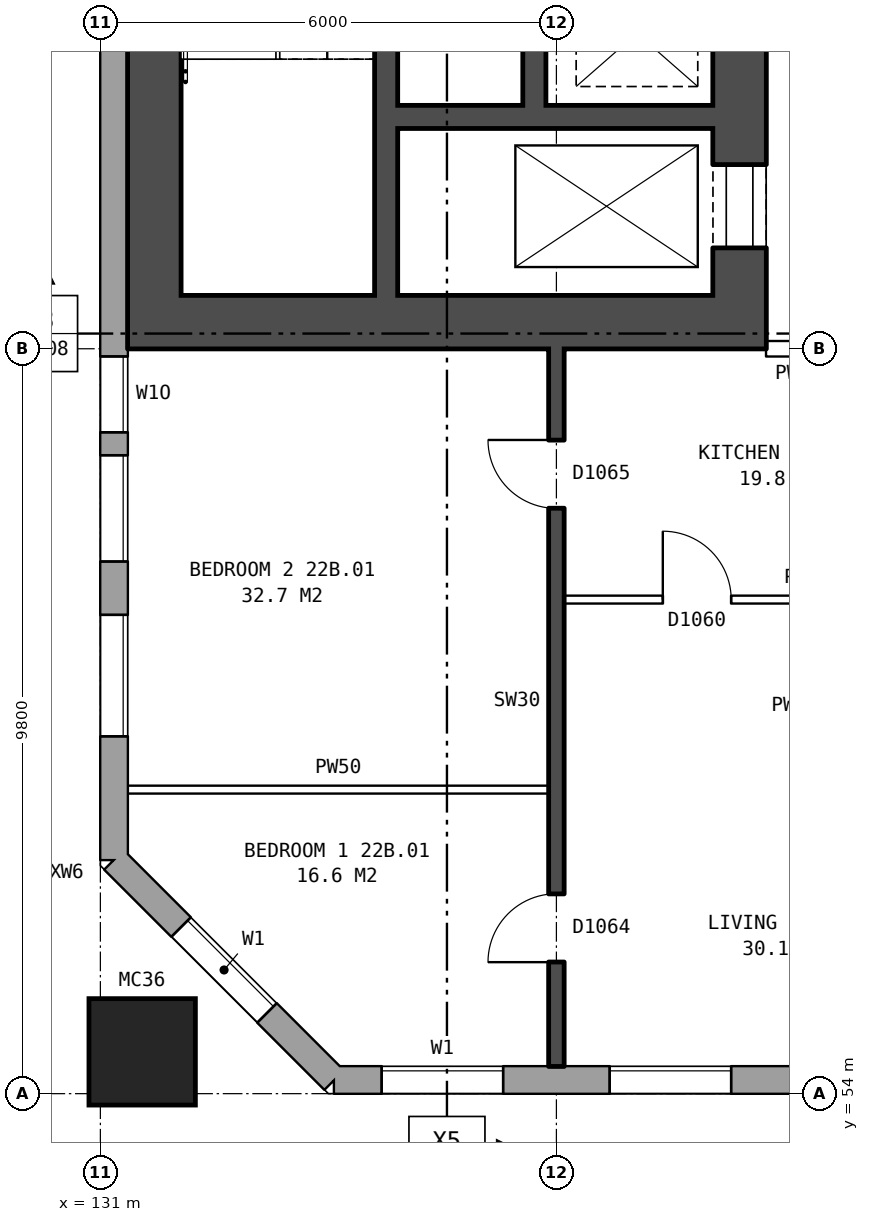
"""IFC4 building model, lengths in metres.
Left out: names, types, materials, properties, quantities, classifications, styles, units other than length and angle.
Written with IfcOpenShell. Run it as: python <this file> out.ifc"""

import sys

from ifc_helpers import new_model, si_unit, direction, frame, frame_2d, origin, origin_2d, place, context, subcontext, project, spatial, rectangle, hollow_rectangle, extrude, element, fill, save


model = new_model("IFC4")
c1 = context("Model", 3, precision=1e-05, world=origin(), true_north=direction((0.0, 1.0)))
c2 = subcontext(c1, "Body", "Model", "MODEL_VIEW")
j1 = project(units=[si_unit("LENGTHUNIT", "METRE"), si_unit("PLANEANGLEUNIT", "RADIAN")], contexts=[c1])
p1 = place(None, origin())
s1 = spatial("IfcSite", under=j1, at=p1, CompositionType="ELEMENT")
p2 = place(p1, origin())
s2 = spatial("IfcBuilding", under=s1, at=p2, CompositionType="ELEMENT")
p3 = place(p2, frame((0.0, 0.0, 80.9)))
s3 = spatial("IfcBuildingStorey", under=s2, at=p3, CompositionType="ELEMENT", Elevation=80.9)
p4 = place(p3, frame((131.55, 54.55, 0.0), z_axis=(0.0, 0.0, 1.0), x_axis=(1.0, 0.0, 0.0)))
e1 = element("IfcColumn", 1, at=p4, inside=s3, PredefinedType="COLUMN", context=c2, shape_type="SweptSolid", body=[
    extrude(hollow_rectangle(XDim=1.4, YDim=1.4, WallThickness=0.075, at=origin_2d()), origin(), (0.0, 0.0, 1.0), 3.1),
])
p5 = place(p3, frame((131.18, 57.075, 0.0), z_axis=(0.0, 0.0, 1.0), x_axis=(0.707106781187, -0.707106781187, 0.0)))
e2 = element("IfcWall", 2, at=p5, inside=s3, PredefinedType="STANDARD", context=c2, shape_type="SweptSolid", body=[
    extrude(rectangle(XDim=4.094, YDim=0.36, at=frame_2d((2.047, 0.0))), origin(), (0.0, 0.0, 1.0), 2.85),
])
p6 = place(p5, frame((1.247, 0.0, 0.8)))
e3 = element("IfcOpeningElement", 3, at=p6, cuts=e2, PredefinedType="OPENING", context=c2, shape_type="SweptSolid", body=[
    extrude(rectangle(XDim=1.6, YDim=1.8, at=frame_2d((0.8, 0.9))), frame((0.0, 0.19, 0.0), z_axis=(0.0, -1.0, 0.0), x_axis=(1.0, 0.0, 0.0)), (0.0, 0.0, 1.0), 0.38),
])
p7 = place(p3, frame((134.075, 54.18, 0.0), z_axis=(0.0, 0.0, 1.0), x_axis=(1.0, 0.0, 0.0)))
e4 = element("IfcWall", 4, at=p7, inside=s3, PredefinedType="STANDARD", context=c2, shape_type="SweptSolid", body=[
    extrude(rectangle(XDim=38.101, YDim=0.36, at=frame_2d((19.05, 0.0))), origin(), (0.0, 0.0, 1.0), 2.85),
])
p8 = place(p7, frame((0.625, 0.0, 0.8)))
e5 = element("IfcOpeningElement", 5, at=p8, cuts=e4, PredefinedType="OPENING", context=c2, shape_type="SweptSolid", body=[
    extrude(rectangle(XDim=1.6, YDim=1.8, at=frame_2d((0.8, 0.9))), frame((0.0, 0.19, 0.0), z_axis=(0.0, -1.0, 0.0), x_axis=(1.0, 0.0, 0.0)), (0.0, 0.0, 1.0), 0.38),
])
p9 = place(p7, frame((3.625, 0.0, 0.8)))
e6 = element("IfcOpeningElement", 6, at=p9, cuts=e4, PredefinedType="OPENING", context=c2, shape_type="SweptSolid", body=[
    extrude(rectangle(XDim=1.6, YDim=1.8, at=frame_2d((0.8, 0.9))), frame((0.0, 0.19, 0.0), z_axis=(0.0, -1.0, 0.0), x_axis=(1.0, 0.0, 0.0)), (0.0, 0.0, 1.0), 0.38),
])
p10 = place(p7, frame((6.625, 0.0, 0.8)))
e7 = element("IfcOpeningElement", 7, at=p10, cuts=e4, PredefinedType="OPENING", context=c2, shape_type="SweptSolid", body=[
    extrude(rectangle(XDim=1.6, YDim=1.8, at=frame_2d((0.8, 0.9))), frame((0.0, 0.19, 0.0), z_axis=(0.0, -1.0, 0.0), x_axis=(1.0, 0.0, 0.0)), (0.0, 0.0, 1.0), 0.38),
])
p11 = place(p7, frame((9.125, 0.0, 0.8)))
e8 = element("IfcOpeningElement", 8, at=p11, cuts=e4, PredefinedType="OPENING", context=c2, shape_type="SweptSolid", body=[
    extrude(rectangle(XDim=1.4, YDim=1.8, at=frame_2d((0.7, 0.9))), frame((0.0, 0.19, 0.0), z_axis=(0.0, -1.0, 0.0), x_axis=(1.0, 0.0, 0.0)), (0.0, 0.0, 1.0), 0.38),
])
p12 = place(p7, frame((12.575, 0.0, 0.8)))
e9 = element("IfcOpeningElement", 9, at=p12, cuts=e4, PredefinedType="OPENING", context=c2, shape_type="SweptSolid", body=[
    extrude(rectangle(XDim=0.6, YDim=0.9, at=frame_2d((0.3, 0.45))), frame((0.0, 0.19, 0.0), z_axis=(0.0, -1.0, 0.0), x_axis=(1.0, 0.0, 0.0)), (0.0, 0.0, 1.0), 0.38),
])
p13 = place(p7, frame((15.625, 0.0, 0.8)))
e10 = element("IfcOpeningElement", 10, at=p13, cuts=e4, PredefinedType="OPENING", context=c2, shape_type="SweptSolid", body=[
    extrude(rectangle(XDim=1.6, YDim=1.8, at=frame_2d((0.8, 0.9))), frame((0.0, 0.19, 0.0), z_axis=(0.0, -1.0, 0.0), x_axis=(1.0, 0.0, 0.0)), (0.0, 0.0, 1.0), 0.38),
])
p14 = place(p7, frame((18.625, 0.0, 0.8)))
e11 = element("IfcOpeningElement", 11, at=p14, cuts=e4, PredefinedType="OPENING", context=c2, shape_type="SweptSolid", body=[
    extrude(rectangle(XDim=1.6, YDim=1.8, at=frame_2d((0.8, 0.9))), frame((0.0, 0.19, 0.0), z_axis=(0.0, -1.0, 0.0), x_axis=(1.0, 0.0, 0.0)), (0.0, 0.0, 1.0), 0.38),
])
p15 = place(p7, frame((21.625, 0.0, 0.8)))
e12 = element("IfcOpeningElement", 12, at=p15, cuts=e4, PredefinedType="OPENING", context=c2, shape_type="SweptSolid", body=[
    extrude(rectangle(XDim=1.6, YDim=1.8, at=frame_2d((0.8, 0.9))), frame((0.0, 0.19, 0.0), z_axis=(0.0, -1.0, 0.0), x_axis=(1.0, 0.0, 0.0)), (0.0, 0.0, 1.0), 0.38),
])
p16 = place(p7, frame((23.525, 0.0, 0.8)))
e13 = element("IfcOpeningElement", 13, at=p16, cuts=e4, PredefinedType="OPENING", context=c2, shape_type="SweptSolid", body=[
    extrude(rectangle(XDim=1.0, YDim=1.8, at=frame_2d((0.5, 0.9))), frame((0.0, 0.19, 0.0), z_axis=(0.0, -1.0, 0.0), x_axis=(1.0, 0.0, 0.0)), (0.0, 0.0, 1.0), 0.38),
])
p17 = place(p7, frame((27.625, 0.0, 0.8)))
e14 = element("IfcOpeningElement", 14, at=p17, cuts=e4, PredefinedType="OPENING", context=c2, shape_type="SweptSolid", body=[
    extrude(rectangle(XDim=1.6, YDim=1.8, at=frame_2d((0.8, 0.9))), frame((0.0, 0.19, 0.0), z_axis=(0.0, -1.0, 0.0), x_axis=(1.0, 0.0, 0.0)), (0.0, 0.0, 1.0), 0.38),
])
p18 = place(p7, frame((30.625, 0.0, 0.8)))
e15 = element("IfcOpeningElement", 15, at=p18, cuts=e4, PredefinedType="OPENING", context=c2, shape_type="SweptSolid", body=[
    extrude(rectangle(XDim=1.6, YDim=1.8, at=frame_2d((0.8, 0.9))), frame((0.0, 0.19, 0.0), z_axis=(0.0, -1.0, 0.0), x_axis=(1.0, 0.0, 0.0)), (0.0, 0.0, 1.0), 0.38),
])
p19 = place(p7, frame((33.625, 0.0, 0.8)))
e16 = element("IfcOpeningElement", 16, at=p19, cuts=e4, PredefinedType="OPENING", context=c2, shape_type="SweptSolid", body=[
    extrude(rectangle(XDim=1.6, YDim=1.8, at=frame_2d((0.8, 0.9))), frame((0.0, 0.19, 0.0), z_axis=(0.0, -1.0, 0.0), x_axis=(1.0, 0.0, 0.0)), (0.0, 0.0, 1.0), 0.38),
])
p20 = place(p7, frame((10.825, 0.0, 1.7)))
e17 = element("IfcOpeningElement", 17, at=p20, cuts=e4, PredefinedType="OPENING", context=c2, shape_type="SweptSolid", body=[
    extrude(rectangle(XDim=0.6, YDim=0.9, at=frame_2d((0.3, 0.45))), frame((0.0, 0.19, 0.0), z_axis=(0.0, -1.0, 0.0), x_axis=(1.0, 0.0, 0.0)), (0.0, 0.0, 1.0), 0.38),
])
p21 = place(p7, frame((13.475, 0.0, 0.8)))
e18 = element("IfcOpeningElement", 18, at=p21, cuts=e4, PredefinedType="OPENING", context=c2, shape_type="SweptSolid", body=[
    extrude(rectangle(XDim=1.2, YDim=1.8, at=frame_2d((0.6, 0.9))), frame((0.0, 0.19, 0.0), z_axis=(0.0, -1.0, 0.0), x_axis=(1.0, 0.0, 0.0)), (0.0, 0.0, 1.0), 0.38),
])
p22 = place(p7, frame((24.825, 0.0, 0.8)))
e19 = element("IfcOpeningElement", 19, at=p22, cuts=e4, PredefinedType="OPENING", context=c2, shape_type="SweptSolid", body=[
    extrude(rectangle(XDim=0.6, YDim=0.9, at=frame_2d((0.3, 0.45))), frame((0.0, 0.19, 0.0), z_axis=(0.0, -1.0, 0.0), x_axis=(1.0, 0.0, 0.0)), (0.0, 0.0, 1.0), 0.38),
])
p23 = place(p3, frame((131.18, 82.925, 0.0), z_axis=(0.0, 0.0, 1.0), x_axis=(0.0, -1.0, 0.0)))
e20 = element("IfcWall", 20, at=p23, inside=s3, PredefinedType="STANDARD", context=c2, shape_type="SweptSolid", body=[
    extrude(rectangle(XDim=25.851, YDim=0.36, at=frame_2d((12.925, 0.0))), origin(), (0.0, 0.0, 1.0), 2.85),
])
p24 = place(p23, frame((1.625, 0.0, 0.8)))
e21 = element("IfcOpeningElement", 21, at=p24, cuts=e20, PredefinedType="OPENING", context=c2, shape_type="SweptSolid", body=[
    extrude(rectangle(XDim=1.6, YDim=1.8, at=frame_2d((0.8, 0.9))), frame((0.0, 0.19, 0.0), z_axis=(0.0, -1.0, 0.0), x_axis=(1.0, 0.0, 0.0)), (0.0, 0.0, 1.0), 0.38),
])
p25 = place(p23, frame((3.525, 0.0, 0.8)))
e22 = element("IfcOpeningElement", 22, at=p25, cuts=e20, PredefinedType="OPENING", context=c2, shape_type="SweptSolid", body=[
    extrude(rectangle(XDim=1.4, YDim=1.8, at=frame_2d((0.7, 0.9))), frame((0.0, 0.19, 0.0), z_axis=(0.0, -1.0, 0.0), x_axis=(1.0, 0.0, 0.0)), (0.0, 0.0, 1.0), 0.38),
])
p26 = place(p23, frame((19.225, 0.0, 0.8)))
e23 = element("IfcOpeningElement", 23, at=p26, cuts=e20, PredefinedType="OPENING", context=c2, shape_type="SweptSolid", body=[
    extrude(rectangle(XDim=1.0, YDim=1.2, at=frame_2d((0.5, 0.6))), frame((0.0, 0.19, 0.0), z_axis=(0.0, -1.0, 0.0), x_axis=(1.0, 0.0, 0.0)), (0.0, 0.0, 1.0), 0.38),
])
p27 = place(p23, frame((22.625, 0.0, 0.8)))
e24 = element("IfcOpeningElement", 24, at=p27, cuts=e20, PredefinedType="OPENING", context=c2, shape_type="SweptSolid", body=[
    extrude(rectangle(XDim=1.6, YDim=1.8, at=frame_2d((0.8, 0.9))), frame((0.0, 0.19, 0.0), z_axis=(0.0, -1.0, 0.0), x_axis=(1.0, 0.0, 0.0)), (0.0, 0.0, 1.0), 0.38),
])
p28 = place(p23, frame((5.225, 0.0, 0.8)))
e25 = element("IfcOpeningElement", 25, at=p28, cuts=e20, PredefinedType="OPENING", context=c2, shape_type="SweptSolid", body=[
    extrude(rectangle(XDim=0.8, YDim=1.5, at=frame_2d((0.4, 0.75))), frame((0.0, 0.19, 0.0), z_axis=(0.0, -1.0, 0.0), x_axis=(1.0, 0.0, 0.0)), (0.0, 0.0, 1.0), 0.38),
])
p29 = place(p23, frame((20.525, 0.0, 0.8)))
e26 = element("IfcOpeningElement", 26, at=p29, cuts=e20, PredefinedType="OPENING", context=c2, shape_type="SweptSolid", body=[
    extrude(rectangle(XDim=1.4, YDim=1.8, at=frame_2d((0.7, 0.9))), frame((0.0, 0.19, 0.0), z_axis=(0.0, -1.0, 0.0), x_axis=(1.0, 0.0, 0.0)), (0.0, 0.0, 1.0), 0.38),
])
p30 = place(p3, frame((139.41, 64.5, 0.0), z_axis=(0.0, 0.0, 1.0), x_axis=(0.0, 1.0, 0.0)))
e27 = element("IfcWall", 27, at=p30, inside=s3, PredefinedType="SHEAR", context=c2, shape_type="SweptSolid", body=[
    extrude(rectangle(XDim=11.0, YDim=0.7, at=frame_2d((5.5, 0.0))), origin(), (0.0, 0.0, 1.0), 2.85),
])
p31 = place(p30, frame((0.625, 0.0, 0.0)))
e28 = element("IfcOpeningElement", 28, at=p31, cuts=e27, PredefinedType="OPENING", context=c2, shape_type="SweptSolid", body=[
    extrude(rectangle(XDim=1.1, YDim=2.1, at=frame_2d((0.55, 1.05))), frame((0.0, 0.36, 0.0), z_axis=(0.0, -1.0, 0.0), x_axis=(1.0, 0.0, 0.0)), (0.0, 0.0, 1.0), 0.72),
])
p32 = place(p30, frame((9.2, 0.0, 0.0)))
e29 = element("IfcOpeningElement", 29, at=p32, cuts=e27, PredefinedType="OPENING", context=c2, shape_type="SweptSolid", body=[
    extrude(rectangle(XDim=1.1, YDim=2.1, at=frame_2d((0.55, 1.05))), frame((0.0, 0.36, 0.0), z_axis=(0.0, -1.0, 0.0), x_axis=(1.0, 0.0, 0.0)), (0.0, 0.0, 1.0), 0.72),
])
p33 = place(p30, frame((7.425, 0.0, 0.0)))
e30 = element("IfcOpeningElement", 30, at=p33, cuts=e27, PredefinedType="OPENING", context=c2, shape_type="SweptSolid", body=[
    extrude(rectangle(XDim=0.85, YDim=2.1, at=frame_2d((0.425, 1.05))), frame((0.0, 0.36, 0.0), z_axis=(0.0, -1.0, 0.0), x_axis=(1.0, 0.0, 0.0)), (0.0, 0.0, 1.0), 0.72),
])
p34 = place(p3, frame((131.71, 64.5, 0.0), z_axis=(0.0, 0.0, 1.0), x_axis=(0.0, 1.0, 0.0)))
e31 = element("IfcWall", 31, at=p34, inside=s3, PredefinedType="SHEAR", context=c2, shape_type="SweptSolid", body=[
    extrude(rectangle(XDim=11.0, YDim=0.7, at=frame_2d((5.5, 0.0))), origin(), (0.0, 0.0, 1.0), 2.85),
])
p35 = place(p3, frame((139.76, 64.15, 0.0), z_axis=(0.0, 0.0, 1.0), x_axis=(-1.0, 0.0, 0.0)))
e32 = element("IfcWall", 32, at=p35, inside=s3, PredefinedType="SHEAR", context=c2, shape_type="SweptSolid", body=[
    extrude(rectangle(XDim=8.4, YDim=0.7, at=frame_2d((4.2, 0.0))), origin(), (0.0, 0.0, 1.0), 2.85),
])
p36 = place(p3, frame((139.06, 66.85, 0.0), z_axis=(0.0, 0.0, 1.0), x_axis=(-1.0, 0.0, 0.0)))
e33 = element("IfcWall", 33, at=p36, inside=s3, PredefinedType="SHEAR", context=c2, shape_type="SweptSolid", body=[
    extrude(rectangle(XDim=4.15, YDim=0.3, at=frame_2d((2.075, 0.0))), origin(), (0.0, 0.0, 1.0), 2.85),
])
p37 = place(p3, frame((136.71, 67.0, 0.0), z_axis=(0.0, 0.0, 1.0), x_axis=(0.0, 1.0, 0.0)))
e34 = element("IfcWall", 34, at=p37, inside=s3, PredefinedType="SHEAR", context=c2, shape_type="SweptSolid", body=[
    extrude(rectangle(XDim=4.1, YDim=0.3, at=frame_2d((2.05, 0.0))), origin(), (0.0, 0.0, 1.0), 2.85),
])
p38 = place(p3, frame((134.76, 64.5, 0.0), z_axis=(0.0, 0.0, 1.0), x_axis=(0.0, 1.0, 0.0)))
e35 = element("IfcWall", 35, at=p38, inside=s3, PredefinedType="SHEAR", context=c2, shape_type="SweptSolid", body=[
    extrude(rectangle(XDim=6.6, YDim=0.3, at=frame_2d((3.3, 0.0))), origin(), (0.0, 0.0, 1.0), 2.85),
])
p39 = place(p3, frame((131.36, 58.0, 0.0), z_axis=(0.0, 0.0, 1.0), x_axis=(1.0, 0.0, 0.0)))
e36 = element("IfcWall", 36, at=p39, inside=s3, PredefinedType="PARTITIONING", context=c2, shape_type="SweptSolid", body=[
    extrude(rectangle(XDim=5.54, YDim=0.1, at=frame_2d((2.77, 0.0))), origin(), (0.0, 0.0, 1.0), 2.85),
])
p40 = place(p3, frame((137.1, 60.5, 0.0), z_axis=(0.0, 0.0, 1.0), x_axis=(1.0, 0.0, 0.0)))
e37 = element("IfcWall", 37, at=p40, inside=s3, PredefinedType="PARTITIONING", context=c2, shape_type="SweptSolid", body=[
    extrude(rectangle(XDim=5.8, YDim=0.1, at=frame_2d((2.9, 0.0))), origin(), (0.0, 0.0, 1.0), 2.85),
])
p41 = place(p40, frame((1.3, 0.0, 0.0)))
e38 = element("IfcOpeningElement", 38, at=p41, cuts=e37, PredefinedType="OPENING", context=c2, shape_type="SweptSolid", body=[
    extrude(rectangle(XDim=0.9, YDim=2.1, at=frame_2d((0.45, 1.05))), frame((0.0, 0.06, 0.0), z_axis=(0.0, -1.0, 0.0), x_axis=(1.0, 0.0, 0.0)), (0.0, 0.0, 1.0), 0.12),
])
p42 = place(p40, frame((4.2, 0.0, 0.0)))
e39 = element("IfcOpeningElement", 39, at=p42, cuts=e37, PredefinedType="OPENING", context=c2, shape_type="SweptSolid", body=[
    extrude(rectangle(XDim=0.9, YDim=2.1, at=frame_2d((0.45, 1.05))), frame((0.0, 0.06, 0.0), z_axis=(0.0, -1.0, 0.0), x_axis=(1.0, 0.0, 0.0)), (0.0, 0.0, 1.0), 0.12),
])
p43 = place(p3, frame((139.76, 63.8, 0.0), z_axis=(0.0, 0.0, 1.0), x_axis=(1.0, 0.0, 0.0)))
e40 = element("IfcWall", 40, at=p43, inside=s3, PredefinedType="PARTITIONING", context=c2, shape_type="SweptSolid", body=[
    extrude(rectangle(XDim=3.0, YDim=0.2, at=frame_2d((1.5, 0.0))), origin(), (0.0, 0.0, 1.0), 2.85),
])
p44 = place(p43, frame((1.0, 0.0, 0.0)))
e41 = element("IfcOpeningElement", 41, at=p44, cuts=e40, PredefinedType="OPENING", context=c2, shape_type="SweptSolid", body=[
    extrude(rectangle(XDim=1.0, YDim=2.1, at=frame_2d((0.5, 1.05))), frame((0.0, 0.11, 0.0), z_axis=(0.0, -1.0, 0.0), x_axis=(1.0, 0.0, 0.0)), (0.0, 0.0, 1.0), 0.22),
])
p45 = place(p3, frame((137.0, 54.36, 0.0), z_axis=(0.0, 0.0, 1.0), x_axis=(0.0, 1.0, 0.0)))
e42 = element("IfcWall", 42, at=p45, inside=s3, PredefinedType="SOLIDWALL", context=c2, shape_type="SweptSolid", body=[
    extrude(rectangle(XDim=9.44, YDim=0.2, at=frame_2d((4.72, 0.0))), origin(), (0.0, 0.0, 1.0), 2.85),
])
p46 = place(p45, frame((1.37, 0.0, 0.0)))
e43 = element("IfcOpeningElement", 43, at=p46, cuts=e42, PredefinedType="OPENING", context=c2, shape_type="SweptSolid", body=[
    extrude(rectangle(XDim=0.9, YDim=2.1, at=frame_2d((0.45, 1.05))), frame((0.0, 0.11, 0.0), z_axis=(0.0, -1.0, 0.0), x_axis=(1.0, 0.0, 0.0)), (0.0, 0.0, 1.0), 0.22),
])
p47 = place(p45, frame((7.34, 0.0, 0.0)))
e44 = element("IfcOpeningElement", 44, at=p47, cuts=e42, PredefinedType="OPENING", context=c2, shape_type="SweptSolid", body=[
    extrude(rectangle(XDim=0.9, YDim=2.1, at=frame_2d((0.45, 1.05))), frame((0.0, 0.11, 0.0), z_axis=(0.0, -1.0, 0.0), x_axis=(1.0, 0.0, 0.0)), (0.0, 0.0, 1.0), 0.22),
])
p48 = place(p6, origin())
e45 = element("IfcWindow", 45, at=p48, inside=s3, PartitioningType="SINGLE_PANEL", PredefinedType="WINDOW", context=c2, shape_type="SweptSolid", body=[
    extrude(rectangle(XDim=1.6, YDim=1.8, at=frame_2d((0.8, 0.9))), frame((0.0, 0.15, 0.0), z_axis=(0.0, -1.0, 0.0), x_axis=(1.0, 0.0, 0.0)), (0.0, 0.0, 1.0), 0.06),
])
fill(e3, e45)
p49 = place(p8, origin())
e46 = element("IfcWindow", 46, at=p49, inside=s3, PartitioningType="SINGLE_PANEL", PredefinedType="WINDOW", context=c2, shape_type="SweptSolid", body=[
    extrude(rectangle(XDim=1.6, YDim=1.8, at=frame_2d((0.8, 0.9))), frame((0.0, 0.15, 0.0), z_axis=(0.0, -1.0, 0.0), x_axis=(1.0, 0.0, 0.0)), (0.0, 0.0, 1.0), 0.06),
])
fill(e5, e46)
p50 = place(p9, origin())
e47 = element("IfcWindow", 47, at=p50, inside=s3, PartitioningType="SINGLE_PANEL", PredefinedType="WINDOW", context=c2, shape_type="SweptSolid", body=[
    extrude(rectangle(XDim=1.6, YDim=1.8, at=frame_2d((0.8, 0.9))), frame((0.0, 0.15, 0.0), z_axis=(0.0, -1.0, 0.0), x_axis=(1.0, 0.0, 0.0)), (0.0, 0.0, 1.0), 0.06),
])
fill(e6, e47)
p51 = place(p26, origin())
e48 = element("IfcWindow", 48, at=p51, inside=s3, PartitioningType="SINGLE_PANEL", PredefinedType="WINDOW", context=c2, shape_type="SweptSolid", body=[
    extrude(rectangle(XDim=1.0, YDim=1.2, at=frame_2d((0.5, 0.6))), frame((0.0, 0.15, 0.0), z_axis=(0.0, -1.0, 0.0), x_axis=(1.0, 0.0, 0.0)), (0.0, 0.0, 1.0), 0.06),
])
fill(e23, e48)
p52 = place(p27, origin())
e49 = element("IfcWindow", 49, at=p52, inside=s3, PartitioningType="SINGLE_PANEL", PredefinedType="WINDOW", context=c2, shape_type="SweptSolid", body=[
    extrude(rectangle(XDim=1.6, YDim=1.8, at=frame_2d((0.8, 0.9))), frame((0.0, 0.15, 0.0), z_axis=(0.0, -1.0, 0.0), x_axis=(1.0, 0.0, 0.0)), (0.0, 0.0, 1.0), 0.06),
])
fill(e24, e49)
p53 = place(p31, origin())
e50 = element("IfcDoor", 50, at=p53, inside=s3, OperationType="DOUBLE_DOOR_SLIDING", PredefinedType="DOOR", context=c2, shape_type="SweptSolid", body=[
    extrude(rectangle(XDim=1.1, YDim=2.1, at=frame_2d((0.55, 1.05))), frame((0.0, 0.335, 0.0), z_axis=(0.0, -1.0, 0.0), x_axis=(1.0, 0.0, 0.0)), (0.0, 0.0, 1.0), 0.05),
])
fill(e28, e50)
p54 = place(p46, origin())
e51 = element("IfcDoor", 51, at=p54, inside=s3, OperationType="SINGLE_SWING_LEFT", PredefinedType="DOOR", context=c2, shape_type="SweptSolid", body=[
    extrude(rectangle(XDim=0.9, YDim=2.1, at=frame_2d((0.45, 1.05))), frame((0.0, 0.025, 0.0), z_axis=(0.0, -1.0, 0.0), x_axis=(1.0, 0.0, 0.0)), (0.0, 0.0, 1.0), 0.05),
])
fill(e43, e51)
p55 = place(p47, origin())
e52 = element("IfcDoor", 52, at=p55, inside=s3, OperationType="SINGLE_SWING_RIGHT", PredefinedType="DOOR", context=c2, shape_type="SweptSolid", body=[
    extrude(rectangle(XDim=0.9, YDim=2.1, at=frame_2d((0.45, 1.05))), frame((0.0, 0.025, 0.0), z_axis=(0.0, -1.0, 0.0), x_axis=(1.0, 0.0, 0.0)), (0.0, 0.0, 1.0), 0.05),
])
fill(e44, e52)
p56 = place(p41, origin())
e53 = element("IfcDoor", 53, at=p56, inside=s3, OperationType="SINGLE_SWING_LEFT", PredefinedType="DOOR", context=c2, shape_type="SweptSolid", body=[
    extrude(rectangle(XDim=0.9, YDim=2.1, at=frame_2d((0.45, 1.05))), frame((0.0, 0.025, 0.0), z_axis=(0.0, -1.0, 0.0), x_axis=(1.0, 0.0, 0.0)), (0.0, 0.0, 1.0), 0.05),
])
fill(e38, e53)
p57 = place(p29, origin())
e54 = element("IfcWindow", 54, at=p57, inside=s3, PartitioningType="SINGLE_PANEL", PredefinedType="WINDOW", context=c2, shape_type="SweptSolid", body=[
    extrude(rectangle(XDim=1.4, YDim=1.8, at=frame_2d((0.7, 0.9))), frame((0.0, 0.15, 0.0), z_axis=(0.0, -1.0, 0.0), x_axis=(1.0, 0.0, 0.0)), (0.0, 0.0, 1.0), 0.06),
])
fill(e26, e54)
save(model, sys.argv[1])
